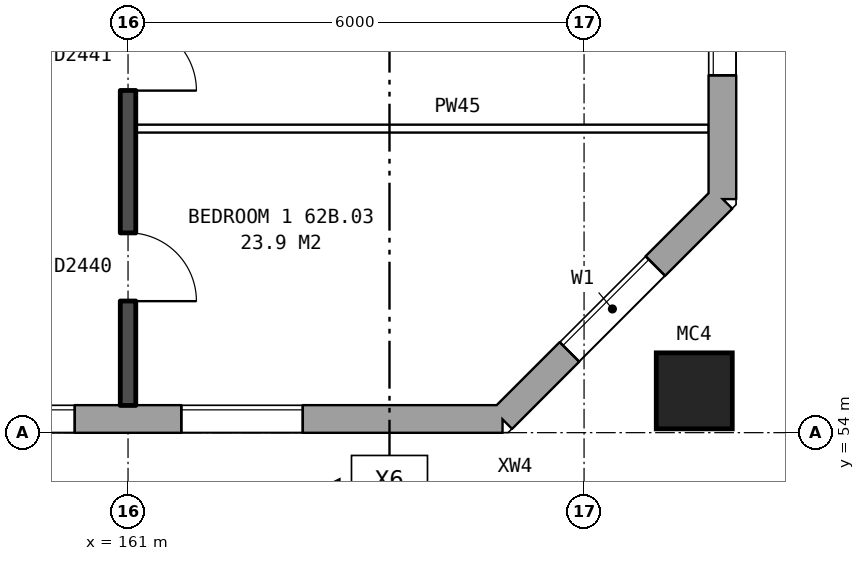
"""IFC4 building model, lengths in metres.
Left out: names, types, materials, properties, quantities, classifications, styles, units other than length and angle.
Written with IfcOpenShell. Run it as: python <this file> out.ifc"""

import sys

from ifc_helpers import new_model, si_unit, direction, frame, frame_2d, origin, origin_2d, place, context, subcontext, project, spatial, rectangle, hollow_rectangle, extrude, element, fill, save


model = new_model("IFC4")
c1 = context("Model", 3, precision=1e-05, world=origin(), true_north=direction((0.0, 1.0)))
c2 = subcontext(c1, "Body", "Model", "MODEL_VIEW")
j1 = project(units=[si_unit("LENGTHUNIT", "METRE"), si_unit("PLANEANGLEUNIT", "RADIAN")], contexts=[c1])
p1 = place(None, origin())
s1 = spatial("IfcSite", under=j1, at=p1, CompositionType="ELEMENT")
p2 = place(p1, origin())
s2 = spatial("IfcBuilding", under=s1, at=p2, CompositionType="ELEMENT")
p3 = place(p2, frame((0.0, 0.0, 221.4)))
s3 = spatial("IfcBuildingStorey", under=s2, at=p3, CompositionType="ELEMENT", Elevation=221.4)
p4 = place(p3, frame((168.45, 54.55, 0.0), z_axis=(0.0, 0.0, 1.0), x_axis=(1.0, 0.0, 0.0)))
e1 = element("IfcColumn", 1, at=p4, inside=s3, PredefinedType="COLUMN", context=c2, shape_type="SweptSolid", body=[
    extrude(hollow_rectangle(XDim=1.0, YDim=1.0, WallThickness=0.055, at=origin_2d()), origin(), (0.0, 0.0, 1.0), 3.1),
])
p5 = place(p3, frame((132.05, 54.18, 0.0), z_axis=(0.0, 0.0, 1.0), x_axis=(1.0, 0.0, 0.0)))
e2 = element("IfcWall", 2, at=p5, inside=s3, PredefinedType="STANDARD", context=c2, shape_type="SweptSolid", body=[
    extrude(rectangle(XDim=33.875, YDim=0.36, at=frame_2d((16.938, 0.0))), origin(), (0.0, 0.0, 1.0), 2.85),
])
p6 = place(p5, frame((2.65, 0.0, 0.8)))
e3 = element("IfcOpeningElement", 3, at=p6, cuts=e2, PredefinedType="OPENING", context=c2, shape_type="SweptSolid", body=[
    extrude(rectangle(XDim=1.6, YDim=1.8, at=frame_2d((0.8, 0.9))), frame((0.0, 0.19, 0.0), z_axis=(0.0, -1.0, 0.0), x_axis=(1.0, 0.0, 0.0)), (0.0, 0.0, 1.0), 0.38),
])
p7 = place(p5, frame((5.65, 0.0, 0.8)))
e4 = element("IfcOpeningElement", 4, at=p7, cuts=e2, PredefinedType="OPENING", context=c2, shape_type="SweptSolid", body=[
    extrude(rectangle(XDim=1.6, YDim=1.8, at=frame_2d((0.8, 0.9))), frame((0.0, 0.19, 0.0), z_axis=(0.0, -1.0, 0.0), x_axis=(1.0, 0.0, 0.0)), (0.0, 0.0, 1.0), 0.38),
])
p8 = place(p5, frame((7.55, 0.0, 0.8)))
e5 = element("IfcOpeningElement", 5, at=p8, cuts=e2, PredefinedType="OPENING", context=c2, shape_type="SweptSolid", body=[
    extrude(rectangle(XDim=1.6, YDim=1.8, at=frame_2d((0.8, 0.9))), frame((0.0, 0.19, 0.0), z_axis=(0.0, -1.0, 0.0), x_axis=(1.0, 0.0, 0.0)), (0.0, 0.0, 1.0), 0.38),
])
p9 = place(p5, frame((11.65, 0.0, 0.8)))
e6 = element("IfcOpeningElement", 6, at=p9, cuts=e2, PredefinedType="OPENING", context=c2, shape_type="SweptSolid", body=[
    extrude(rectangle(XDim=1.6, YDim=1.8, at=frame_2d((0.8, 0.9))), frame((0.0, 0.19, 0.0), z_axis=(0.0, -1.0, 0.0), x_axis=(1.0, 0.0, 0.0)), (0.0, 0.0, 1.0), 0.38),
])
p10 = place(p5, frame((14.65, 0.0, 0.8)))
e7 = element("IfcOpeningElement", 7, at=p10, cuts=e2, PredefinedType="OPENING", context=c2, shape_type="SweptSolid", body=[
    extrude(rectangle(XDim=1.6, YDim=1.8, at=frame_2d((0.8, 0.9))), frame((0.0, 0.19, 0.0), z_axis=(0.0, -1.0, 0.0), x_axis=(1.0, 0.0, 0.0)), (0.0, 0.0, 1.0), 0.38),
])
p11 = place(p5, frame((17.65, 0.0, 0.8)))
e8 = element("IfcOpeningElement", 8, at=p11, cuts=e2, PredefinedType="OPENING", context=c2, shape_type="SweptSolid", body=[
    extrude(rectangle(XDim=1.6, YDim=1.8, at=frame_2d((0.8, 0.9))), frame((0.0, 0.19, 0.0), z_axis=(0.0, -1.0, 0.0), x_axis=(1.0, 0.0, 0.0)), (0.0, 0.0, 1.0), 0.38),
])
p12 = place(p5, frame((20.65, 0.0, 0.8)))
e9 = element("IfcOpeningElement", 9, at=p12, cuts=e2, PredefinedType="OPENING", context=c2, shape_type="SweptSolid", body=[
    extrude(rectangle(XDim=1.6, YDim=1.8, at=frame_2d((0.8, 0.9))), frame((0.0, 0.19, 0.0), z_axis=(0.0, -1.0, 0.0), x_axis=(1.0, 0.0, 0.0)), (0.0, 0.0, 1.0), 0.38),
])
p13 = place(p5, frame((23.15, 0.0, 0.8)))
e10 = element("IfcOpeningElement", 10, at=p13, cuts=e2, PredefinedType="OPENING", context=c2, shape_type="SweptSolid", body=[
    extrude(rectangle(XDim=1.0, YDim=1.8, at=frame_2d((0.5, 0.9))), frame((0.0, 0.19, 0.0), z_axis=(0.0, -1.0, 0.0), x_axis=(1.0, 0.0, 0.0)), (0.0, 0.0, 1.0), 0.38),
])
p14 = place(p5, frame((26.65, 0.0, 0.8)))
e11 = element("IfcOpeningElement", 11, at=p14, cuts=e2, PredefinedType="OPENING", context=c2, shape_type="SweptSolid", body=[
    extrude(rectangle(XDim=1.6, YDim=1.8, at=frame_2d((0.8, 0.9))), frame((0.0, 0.19, 0.0), z_axis=(0.0, -1.0, 0.0), x_axis=(1.0, 0.0, 0.0)), (0.0, 0.0, 1.0), 0.38),
])
p15 = place(p5, frame((29.65, 0.0, 0.8)))
e12 = element("IfcOpeningElement", 12, at=p15, cuts=e2, PredefinedType="OPENING", context=c2, shape_type="SweptSolid", body=[
    extrude(rectangle(XDim=1.6, YDim=1.8, at=frame_2d((0.8, 0.9))), frame((0.0, 0.19, 0.0), z_axis=(0.0, -1.0, 0.0), x_axis=(1.0, 0.0, 0.0)), (0.0, 0.0, 1.0), 0.38),
])
p16 = place(p5, frame((9.45, 0.0, 1.7)))
e13 = element("IfcOpeningElement", 13, at=p16, cuts=e2, PredefinedType="OPENING", context=c2, shape_type="SweptSolid", body=[
    extrude(rectangle(XDim=0.6, YDim=0.9, at=frame_2d((0.3, 0.45))), frame((0.0, 0.19, 0.0), z_axis=(0.0, -1.0, 0.0), x_axis=(1.0, 0.0, 0.0)), (0.0, 0.0, 1.0), 0.38),
])
p17 = place(p3, frame((165.925, 54.18, 0.0), z_axis=(0.0, 0.0, 1.0), x_axis=(0.707106781187, 0.707106781187, 0.0)))
e14 = element("IfcWall", 14, at=p17, inside=s3, PredefinedType="STANDARD", context=c2, shape_type="SweptSolid", body=[
    extrude(rectangle(XDim=4.094, YDim=0.36, at=frame_2d((2.047, 0.0))), origin(), (0.0, 0.0, 1.0), 2.85),
])
p18 = place(p17, frame((1.247, 0.0, 0.8)))
e15 = element("IfcOpeningElement", 15, at=p18, cuts=e14, PredefinedType="OPENING", context=c2, shape_type="SweptSolid", body=[
    extrude(rectangle(XDim=1.6, YDim=1.8, at=frame_2d((0.8, 0.9))), frame((0.0, 0.19, 0.0), z_axis=(0.0, -1.0, 0.0), x_axis=(1.0, 0.0, 0.0)), (0.0, 0.0, 1.0), 0.38),
])
p19 = place(p3, frame((168.82, 57.075, 0.0), z_axis=(0.0, 0.0, 1.0), x_axis=(0.0, 1.0, 0.0)))
e16 = element("IfcWall", 16, at=p19, inside=s3, PredefinedType="STANDARD", context=c2, shape_type="SweptSolid", body=[
    extrude(rectangle(XDim=25.851, YDim=0.36, at=frame_2d((12.925, 0.0))), origin(), (0.0, 0.0, 1.0), 2.85),
])
p20 = place(p19, frame((1.625, 0.0, 0.8)))
e17 = element("IfcOpeningElement", 17, at=p20, cuts=e16, PredefinedType="OPENING", context=c2, shape_type="SweptSolid", body=[
    extrude(rectangle(XDim=1.6, YDim=1.8, at=frame_2d((0.8, 0.9))), frame((0.0, 0.19, 0.0), z_axis=(0.0, -1.0, 0.0), x_axis=(1.0, 0.0, 0.0)), (0.0, 0.0, 1.0), 0.38),
])
p21 = place(p19, frame((4.625, 0.0, 0.8)))
e18 = element("IfcOpeningElement", 18, at=p21, cuts=e16, PredefinedType="OPENING", context=c2, shape_type="SweptSolid", body=[
    extrude(rectangle(XDim=1.6, YDim=1.8, at=frame_2d((0.8, 0.9))), frame((0.0, 0.19, 0.0), z_axis=(0.0, -1.0, 0.0), x_axis=(1.0, 0.0, 0.0)), (0.0, 0.0, 1.0), 0.38),
])
p22 = place(p19, frame((19.625, 0.0, 0.8)))
e19 = element("IfcOpeningElement", 19, at=p22, cuts=e16, PredefinedType="OPENING", context=c2, shape_type="SweptSolid", body=[
    extrude(rectangle(XDim=1.6, YDim=1.8, at=frame_2d((0.8, 0.9))), frame((0.0, 0.19, 0.0), z_axis=(0.0, -1.0, 0.0), x_axis=(1.0, 0.0, 0.0)), (0.0, 0.0, 1.0), 0.38),
])
p23 = place(p19, frame((22.625, 0.0, 0.8)))
e20 = element("IfcOpeningElement", 20, at=p23, cuts=e16, PredefinedType="OPENING", context=c2, shape_type="SweptSolid", body=[
    extrude(rectangle(XDim=1.6, YDim=1.8, at=frame_2d((0.8, 0.9))), frame((0.0, 0.19, 0.0), z_axis=(0.0, -1.0, 0.0), x_axis=(1.0, 0.0, 0.0)), (0.0, 0.0, 1.0), 0.38),
])
p24 = place(p3, frame((161.1, 58.0, 0.0), z_axis=(0.0, 0.0, 1.0), x_axis=(1.0, 0.0, 0.0)))
e21 = element("IfcWall", 21, at=p24, inside=s3, PredefinedType="PARTITIONING", context=c2, shape_type="SweptSolid", body=[
    extrude(rectangle(XDim=7.54, YDim=0.1, at=frame_2d((3.77, 0.0))), origin(), (0.0, 0.0, 1.0), 2.85),
])
p25 = place(p3, frame((161.0, 54.36, 0.0), z_axis=(0.0, 0.0, 1.0), x_axis=(0.0, 1.0, 0.0)))
e22 = element("IfcWall", 22, at=p25, inside=s3, PredefinedType="SOLIDWALL", context=c2, shape_type="SweptSolid", body=[
    extrude(rectangle(XDim=9.44, YDim=0.2, at=frame_2d((4.72, 0.0))), origin(), (0.0, 0.0, 1.0), 2.85),
])
p26 = place(p25, frame((1.37, 0.0, 0.0)))
e23 = element("IfcOpeningElement", 23, at=p26, cuts=e22, PredefinedType="OPENING", context=c2, shape_type="SweptSolid", body=[
    extrude(rectangle(XDim=0.9, YDim=2.1, at=frame_2d((0.45, 1.05))), frame((0.0, 0.11, 0.0), z_axis=(0.0, -1.0, 0.0), x_axis=(1.0, 0.0, 0.0)), (0.0, 0.0, 1.0), 0.22),
])
p27 = place(p25, frame((4.14, 0.0, 0.0)))
e24 = element("IfcOpeningElement", 24, at=p27, cuts=e22, PredefinedType="OPENING", context=c2, shape_type="SweptSolid", body=[
    extrude(rectangle(XDim=0.9, YDim=2.1, at=frame_2d((0.45, 1.05))), frame((0.0, 0.11, 0.0), z_axis=(0.0, -1.0, 0.0), x_axis=(1.0, 0.0, 0.0)), (0.0, 0.0, 1.0), 0.22),
])
p28 = place(p25, frame((7.59, 0.0, 0.0)))
e25 = element("IfcOpeningElement", 25, at=p28, cuts=e22, PredefinedType="OPENING", context=c2, shape_type="SweptSolid", body=[
    extrude(rectangle(XDim=0.9, YDim=2.1, at=frame_2d((0.45, 1.05))), frame((0.0, 0.11, 0.0), z_axis=(0.0, -1.0, 0.0), x_axis=(1.0, 0.0, 0.0)), (0.0, 0.0, 1.0), 0.22),
])
p29 = place(p14, origin())
e26 = element("IfcWindow", 26, at=p29, inside=s3, PartitioningType="SINGLE_PANEL", PredefinedType="WINDOW", context=c2, shape_type="SweptSolid", body=[
    extrude(rectangle(XDim=1.6, YDim=1.8, at=frame_2d((0.8, 0.9))), frame((0.0, 0.15, 0.0), z_axis=(0.0, -1.0, 0.0), x_axis=(1.0, 0.0, 0.0)), (0.0, 0.0, 1.0), 0.06),
])
fill(e11, e26)
p30 = place(p15, origin())
e27 = element("IfcWindow", 27, at=p30, inside=s3, PartitioningType="SINGLE_PANEL", PredefinedType="WINDOW", context=c2, shape_type="SweptSolid", body=[
    extrude(rectangle(XDim=1.6, YDim=1.8, at=frame_2d((0.8, 0.9))), frame((0.0, 0.15, 0.0), z_axis=(0.0, -1.0, 0.0), x_axis=(1.0, 0.0, 0.0)), (0.0, 0.0, 1.0), 0.06),
])
fill(e12, e27)
p31 = place(p18, origin())
e28 = element("IfcWindow", 28, at=p31, inside=s3, PartitioningType="SINGLE_PANEL", PredefinedType="WINDOW", context=c2, shape_type="SweptSolid", body=[
    extrude(rectangle(XDim=1.6, YDim=1.8, at=frame_2d((0.8, 0.9))), frame((0.0, 0.15, 0.0), z_axis=(0.0, -1.0, 0.0), x_axis=(1.0, 0.0, 0.0)), (0.0, 0.0, 1.0), 0.06),
])
fill(e15, e28)
p32 = place(p20, origin())
e29 = element("IfcWindow", 29, at=p32, inside=s3, PartitioningType="SINGLE_PANEL", PredefinedType="WINDOW", context=c2, shape_type="SweptSolid", body=[
    extrude(rectangle(XDim=1.6, YDim=1.8, at=frame_2d((0.8, 0.9))), frame((0.0, 0.15, 0.0), z_axis=(0.0, -1.0, 0.0), x_axis=(1.0, 0.0, 0.0)), (0.0, 0.0, 1.0), 0.06),
])
fill(e17, e29)
p33 = place(p26, frame((0.9, 0.0, 0.0), z_axis=(0.0, 0.0, 1.0), x_axis=(-1.0, 0.0, 0.0)))
e30 = element("IfcDoor", 30, at=p33, inside=s3, OperationType="SINGLE_SWING_RIGHT", PredefinedType="DOOR", context=c2, shape_type="SweptSolid", body=[
    extrude(rectangle(XDim=0.9, YDim=2.1, at=frame_2d((0.45, 1.05))), frame((0.0, 0.025, 0.0), z_axis=(0.0, -1.0, 0.0), x_axis=(1.0, 0.0, 0.0)), (0.0, 0.0, 1.0), 0.05),
])
fill(e23, e30)
p34 = place(p27, frame((0.9, 0.0, 0.0), z_axis=(0.0, 0.0, 1.0), x_axis=(-1.0, 0.0, 0.0)))
e31 = element("IfcDoor", 31, at=p34, inside=s3, OperationType="SINGLE_SWING_RIGHT", PredefinedType="DOOR", context=c2, shape_type="SweptSolid", body=[
    extrude(rectangle(XDim=0.9, YDim=2.1, at=frame_2d((0.45, 1.05))), frame((0.0, 0.025, 0.0), z_axis=(0.0, -1.0, 0.0), x_axis=(1.0, 0.0, 0.0)), (0.0, 0.0, 1.0), 0.05),
])
fill(e24, e31)
save(model, sys.argv[1])
